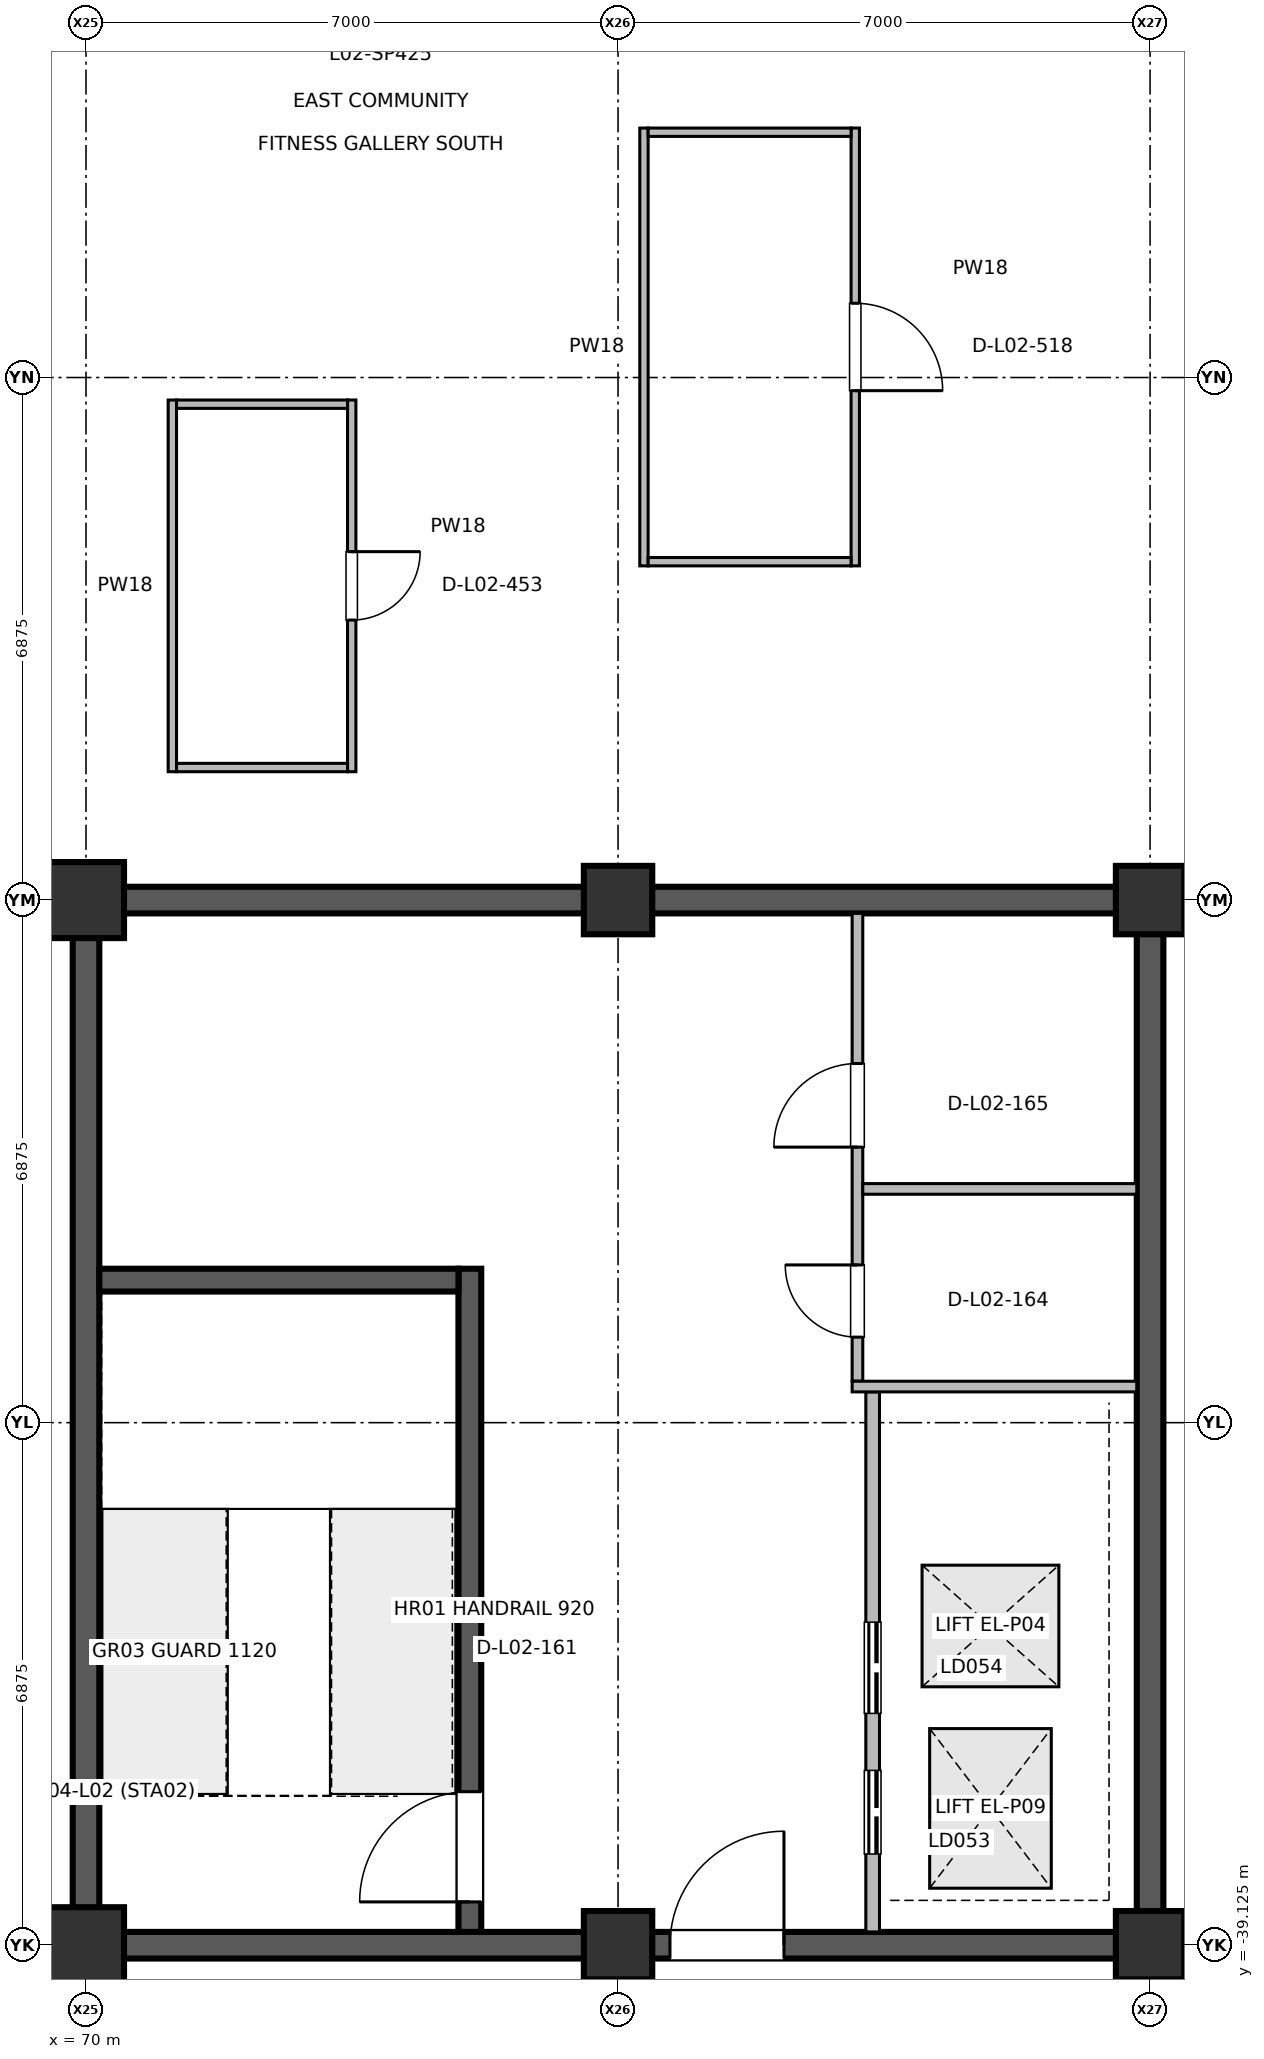
"""IFC4 building model, lengths in metres.
Left out: names, types, materials, properties, quantities, classifications, styles, units other than length and angle.
Written with IfcOpenShell. Run it as: python <this file> out.ifc"""

import sys

from ifc_helpers import new_model, si_unit, direction, frame, frame_2d, origin, origin_2d, place, context, subcontext, project, spatial, rectangle, extrude, element, fill, save


model = new_model("IFC4")
c1 = context("Model", 3, precision=1e-05, world=origin(), true_north=direction((0.0, 1.0)))
c2 = subcontext(c1, "Body", "Model", "MODEL_VIEW")
j1 = project(units=[si_unit("LENGTHUNIT", "METRE"), si_unit("PLANEANGLEUNIT", "RADIAN")], contexts=[c1])
p1 = place(None, origin())
s1 = spatial("IfcSite", under=j1, at=p1, CompositionType="ELEMENT")
p2 = place(p1, origin())
s2 = spatial("IfcBuilding", under=s1, at=p2, CompositionType="ELEMENT")
p3 = place(p2, frame((0.0, 0.0, 6.0)))
s3 = spatial("IfcBuildingStorey", under=s2, at=p3, CompositionType="ELEMENT", Elevation=6.0)
for number, where, z_axis, x_axis in (
    (1, (70.0, -39.125, 0.0), (0.0, 0.0, 1.0), (1.0, 0.0, 0.0)),
    (2, (70.0, -25.375, 0.0), (0.0, 0.0, 1.0), (1.0, 0.0, 0.0)),
):
    element("IfcColumn", number, at=place(p3, frame(where, z_axis=z_axis, x_axis=x_axis)), inside=s3, PredefinedType="COLUMN", context=c2, shape_type="SweptSolid", body=[
        extrude(rectangle(XDim=1.0, YDim=1.0, at=origin_2d()), origin(), (0.0, 0.0, 1.0), 5.398),
    ])
for number, where, z_axis, x_axis in (
    (3, (77.0, -39.125, 0.0), (0.0, 0.0, 1.0), (1.0, 0.0, 0.0)),
    (4, (77.0, -25.375, 0.0), (0.0, 0.0, 1.0), (1.0, 0.0, 0.0)),
    (5, (84.0, -39.125, 0.0), (0.0, 0.0, 1.0), (1.0, 0.0, 0.0)),
    (6, (84.0, -25.375, 0.0), (0.0, 0.0, 1.0), (1.0, 0.0, 0.0)),
):
    element("IfcColumn", number, at=place(p3, frame(where, z_axis=z_axis, x_axis=x_axis)), inside=s3, PredefinedType="COLUMN", context=c2, shape_type="SweptSolid", body=[
        extrude(rectangle(XDim=0.9, YDim=0.9, at=origin_2d()), origin(), (0.0, 0.0, 1.0), 5.398),
    ])
for number, where, z_axis, x_axis in (
    (7, (70.0, -38.95, 0.0), (0.0, 0.0, 1.0), (0.0, 1.0, 0.0)),
    (8, (84.0, -38.95, 0.0), (0.0, 0.0, 1.0), (0.0, 1.0, 0.0)),
):
    element("IfcWall", number, at=place(p3, frame(where, z_axis=z_axis, x_axis=x_axis)), inside=s3, PredefinedType="SHEAR", context=c2, shape_type="SweptSolid", body=[
        extrude(rectangle(XDim=13.4, YDim=0.35, at=frame_2d((6.7, 0.0))), origin(), (0.0, 0.0, 1.0), 5.15),
    ])
p4 = place(p3, frame((70.175, -39.125, 0.0), z_axis=(0.0, 0.0, 1.0), x_axis=(1.0, 0.0, 0.0)))
e9 = element("IfcWall", 9, at=p4, inside=s3, PredefinedType="SHEAR", context=c2, shape_type="SweptSolid", body=[
    extrude(rectangle(XDim=13.65, YDim=0.35, at=frame_2d((6.825, 0.0))), origin(), (0.0, 0.0, 1.0), 5.15),
])
p5 = place(p4, frame((7.508, 0.0, 0.0)))
e10 = element("IfcOpeningElement", 10, at=p5, cuts=e9, PredefinedType="OPENING", context=c2, shape_type="SweptSolid", body=[
    extrude(rectangle(XDim=1.5, YDim=2.2, at=frame_2d((0.75, 1.1))), frame((0.0, 0.185, 0.0), z_axis=(0.0, -1.0, 0.0), x_axis=(1.0, 0.0, 0.0)), (0.0, 0.0, 1.0), 0.37),
])
p6 = place(p3, frame((70.175, -25.375, 0.0), z_axis=(0.0, 0.0, 1.0), x_axis=(1.0, 0.0, 0.0)))
e11 = element("IfcWall", 11, at=p6, inside=s3, PredefinedType="SHEAR", context=c2, shape_type="SweptSolid", body=[
    extrude(rectangle(XDim=13.65, YDim=0.35, at=frame_2d((6.825, 0.0))), origin(), (0.0, 0.0, 1.0), 5.15),
])
p7 = place(p3, frame((75.05, -38.95, 0.0), z_axis=(0.0, 0.0, 1.0), x_axis=(0.0, 1.0, 0.0)))
e12 = element("IfcWall", 12, at=p7, inside=s3, PredefinedType="SHEAR", context=c2, shape_type="SweptSolid", body=[
    extrude(rectangle(XDim=8.725, YDim=0.3, at=frame_2d((4.362, 0.0))), origin(), (0.0, 0.0, 1.0), 5.15),
])
p8 = place(p7, frame((0.395, 0.0, 0.0)))
e13 = element("IfcOpeningElement", 13, at=p8, cuts=e12, PredefinedType="OPENING", context=c2, shape_type="SweptSolid", body=[
    extrude(rectangle(XDim=1.45, YDim=2.2, at=frame_2d((0.725, 1.1))), frame((0.0, 0.16, 0.0), z_axis=(0.0, -1.0, 0.0), x_axis=(1.0, 0.0, 0.0)), (0.0, 0.0, 1.0), 0.32),
])
p9 = place(p3, frame((80.35, -38.95, 0.0), z_axis=(0.0, 0.0, 1.0), x_axis=(0.0, 1.0, 0.0)))
e14 = element("IfcWall", 14, at=p9, inside=s3, PredefinedType="PARTITIONING", context=c2, shape_type="SweptSolid", body=[
    extrude(rectangle(XDim=7.105, YDim=0.18, at=frame_2d((3.552, 0.0))), origin(), (0.0, 0.0, 1.0), 4.42),
])
p10 = place(p9, frame((1.025, 0.0, 0.0)))
e15 = element("IfcOpeningElement", 15, at=p10, cuts=e14, PredefinedType="OPENING", context=c2, shape_type="SweptSolid", body=[
    extrude(rectangle(XDim=1.1, YDim=2.2, at=frame_2d((0.55, 1.1))), frame((0.0, 0.1, 0.0), z_axis=(0.0, -1.0, 0.0), x_axis=(1.0, 0.0, 0.0)), (0.0, 0.0, 1.0), 0.2),
])
p11 = place(p9, frame((2.875, 0.0, 0.0)))
e16 = element("IfcOpeningElement", 16, at=p11, cuts=e14, PredefinedType="OPENING", context=c2, shape_type="SweptSolid", body=[
    extrude(rectangle(XDim=1.2, YDim=2.25, at=frame_2d((0.6, 1.125))), frame((0.0, 0.1, 0.0), z_axis=(0.0, -1.0, 0.0), x_axis=(1.0, 0.0, 0.0)), (0.0, 0.0, 1.0), 0.2),
])
p12 = place(p3, frame((80.15, -31.705, 0.0), z_axis=(0.0, 0.0, 1.0), x_axis=(0.0, 1.0, 0.0)))
e17 = element("IfcWall", 17, at=p12, inside=s3, PredefinedType="PARTITIONING", context=c2, shape_type="SweptSolid", body=[
    extrude(rectangle(XDim=6.155, YDim=0.14, at=frame_2d((3.078, 0.0))), origin(), (0.0, 0.0, 1.0), 4.42),
])
p13 = place(p12, frame((0.58, 0.0, 0.0)))
e18 = element("IfcOpeningElement", 18, at=p13, cuts=e17, PredefinedType="OPENING", context=c2, shape_type="SweptSolid", body=[
    extrude(rectangle(XDim=0.95, YDim=2.15, at=frame_2d((0.475, 1.075))), frame((0.0, 0.08, 0.0), z_axis=(0.0, -1.0, 0.0), x_axis=(1.0, 0.0, 0.0)), (0.0, 0.0, 1.0), 0.16),
])
p14 = place(p12, frame((3.08, 0.0, 0.0)))
e19 = element("IfcOpeningElement", 19, at=p14, cuts=e17, PredefinedType="OPENING", context=c2, shape_type="SweptSolid", body=[
    extrude(rectangle(XDim=1.1, YDim=2.15, at=frame_2d((0.55, 1.075))), frame((0.0, 0.08, 0.0), z_axis=(0.0, -1.0, 0.0), x_axis=(1.0, 0.0, 0.0)), (0.0, 0.0, 1.0), 0.16),
])
p15 = place(p3, frame((73.496, -18.796, 0.0), z_axis=(0.0, 0.0, 1.0), x_axis=(0.0, -1.0, 0.0)))
e20 = element("IfcWall", 20, at=p15, inside=s3, PredefinedType="PARTITIONING", context=c2, shape_type="SweptSolid", body=[
    extrude(rectangle(XDim=4.89, YDim=0.11, at=frame_2d((2.445, 0.0))), origin(), (0.0, 0.0, 1.0), 4.42),
])
p16 = place(p15, frame((1.995, 0.0, 0.0)))
e21 = element("IfcOpeningElement", 21, at=p16, cuts=e20, PredefinedType="OPENING", context=c2, shape_type="SweptSolid", body=[
    extrude(rectangle(XDim=0.9, YDim=2.15, at=frame_2d((0.45, 1.075))), frame((0.0, 0.065, 0.0), z_axis=(0.0, -1.0, 0.0), x_axis=(1.0, 0.0, 0.0)), (0.0, 0.0, 1.0), 0.13),
])
p17 = place(p3, frame((80.121, -15.218, 0.0), z_axis=(0.0, 0.0, 1.0), x_axis=(0.0, -1.0, 0.0)))
e22 = element("IfcWall", 22, at=p17, inside=s3, PredefinedType="PARTITIONING", context=c2, shape_type="SweptSolid", body=[
    extrude(rectangle(XDim=5.76, YDim=0.11, at=frame_2d((2.88, 0.0))), origin(), (0.0, 0.0, 1.0), 4.42),
])
p18 = place(p17, frame((2.305, 0.0, 0.0)))
e23 = element("IfcOpeningElement", 23, at=p18, cuts=e22, PredefinedType="OPENING", context=c2, shape_type="SweptSolid", body=[
    extrude(rectangle(XDim=1.15, YDim=2.2, at=frame_2d((0.575, 1.1))), frame((0.0, 0.065, 0.0), z_axis=(0.0, -1.0, 0.0), x_axis=(1.0, 0.0, 0.0)), (0.0, 0.0, 1.0), 0.13),
])
p19 = place(p3, frame((80.08, -31.775, 0.0), z_axis=(0.0, 0.0, 1.0), x_axis=(1.0, 0.0, 0.0)))
e24 = element("IfcWall", 24, at=p19, inside=s3, PredefinedType="PARTITIONING", context=c2, shape_type="SweptSolid", body=[
    extrude(rectangle(XDim=3.745, YDim=0.14, at=frame_2d((1.873, 0.0))), origin(), (0.0, 0.0, 1.0), 4.42),
])
p20 = place(p3, frame((80.22, -29.175, 0.0), z_axis=(0.0, 0.0, 1.0), x_axis=(1.0, 0.0, 0.0)))
e25 = element("IfcWall", 25, at=p20, inside=s3, PredefinedType="PARTITIONING", context=c2, shape_type="SweptSolid", body=[
    extrude(rectangle(XDim=3.605, YDim=0.14, at=frame_2d((1.802, 0.0))), origin(), (0.0, 0.0, 1.0), 4.42),
])
p21 = place(p3, frame((71.136, -23.686, 0.0), z_axis=(0.0, 0.0, 1.0), x_axis=(0.0, 1.0, 0.0)))
e26 = element("IfcWall", 26, at=p21, inside=s3, PredefinedType="PARTITIONING", context=c2, shape_type="SweptSolid", body=[
    extrude(rectangle(XDim=4.89, YDim=0.11, at=frame_2d((2.445, 0.0))), origin(), (0.0, 0.0, 1.0), 4.42),
])
for number, where, z_axis, x_axis in (
    (27, (71.191, -23.631, 0.0), (0.0, 0.0, 1.0), (1.0, 0.0, 0.0)),
    (28, (71.191, -18.851, 0.0), (0.0, 0.0, 1.0), (1.0, 0.0, 0.0)),
):
    element("IfcWall", number, at=place(p3, frame(where, z_axis=z_axis, x_axis=x_axis)), inside=s3, PredefinedType="PARTITIONING", context=c2, shape_type="SweptSolid", body=[
        extrude(rectangle(XDim=2.25, YDim=0.11, at=frame_2d((1.125, 0.0))), origin(), (0.0, 0.0, 1.0), 4.42),
    ])
p22 = place(p3, frame((77.341, -20.978, 0.0), z_axis=(0.0, 0.0, 1.0), x_axis=(0.0, 1.0, 0.0)))
e29 = element("IfcWall", 29, at=p22, inside=s3, PredefinedType="PARTITIONING", context=c2, shape_type="SweptSolid", body=[
    extrude(rectangle(XDim=5.76, YDim=0.11, at=frame_2d((2.88, 0.0))), origin(), (0.0, 0.0, 1.0), 3.925),
])
for number, where, z_axis, x_axis in (
    (30, (77.396, -20.923, 0.0), (0.0, 0.0, 1.0), (1.0, 0.0, 0.0)),
    (31, (77.396, -15.273, 0.0), (0.0, 0.0, 1.0), (1.0, 0.0, 0.0)),
):
    element("IfcWall", number, at=place(p3, frame(where, z_axis=z_axis, x_axis=x_axis)), inside=s3, PredefinedType="PARTITIONING", context=c2, shape_type="SweptSolid", body=[
        extrude(rectangle(XDim=2.67, YDim=0.11, at=frame_2d((1.335, 0.0))), origin(), (0.0, 0.0, 1.0), 3.925),
    ])
p23 = place(p3, frame((70.175, -30.375, 0.0), z_axis=(0.0, 0.0, 1.0), x_axis=(1.0, 0.0, 0.0)))
e32 = element("IfcWall", 32, at=p23, inside=s3, PredefinedType="SHEAR", context=c2, shape_type="SweptSolid", body=[
    extrude(rectangle(XDim=4.725, YDim=0.3, at=frame_2d((2.362, 0.0))), origin(), (0.0, 0.0, 1.0), 5.15),
])
p24 = place(p5, origin())
e33 = element("IfcDoor", 33, at=p24, inside=s3, OperationType="SINGLE_SWING_RIGHT", PredefinedType="DOOR", context=c2, shape_type="SweptSolid", body=[
    extrude(rectangle(XDim=1.5, YDim=2.2, at=frame_2d((0.75, 1.1))), frame((0.0, 0.025, 0.0), z_axis=(0.0, -1.0, 0.0), x_axis=(1.0, 0.0, 0.0)), (0.0, 0.0, 1.0), 0.05),
])
fill(e10, e33)
p25 = place(p8, origin())
e34 = element("IfcDoor", 34, at=p25, inside=s3, OperationType="SINGLE_SWING_LEFT", PredefinedType="DOOR", context=c2, shape_type="SweptSolid", body=[
    extrude(rectangle(XDim=1.45, YDim=2.2, at=frame_2d((0.725, 1.1))), frame((0.0, 0.025, 0.0), z_axis=(0.0, -1.0, 0.0), x_axis=(1.0, 0.0, 0.0)), (0.0, 0.0, 1.0), 0.05),
])
fill(e13, e34)
p26 = place(p10, origin())
e35 = element("IfcDoor", 35, at=p26, inside=s3, OperationType="DOUBLE_DOOR_SLIDING", PredefinedType="DOOR", context=c2, shape_type="SweptSolid", body=[
    extrude(rectangle(XDim=1.1, YDim=2.2, at=frame_2d((0.55, 1.1))), frame((0.0, 0.025, 0.0), z_axis=(0.0, -1.0, 0.0), x_axis=(1.0, 0.0, 0.0)), (0.0, 0.0, 1.0), 0.05),
])
fill(e15, e35)
p27 = place(p11, origin())
e36 = element("IfcDoor", 36, at=p27, inside=s3, OperationType="DOUBLE_DOOR_SLIDING", PredefinedType="DOOR", context=c2, shape_type="SweptSolid", body=[
    extrude(rectangle(XDim=1.2, YDim=2.25, at=frame_2d((0.6, 1.125))), frame((0.0, 0.025, 0.0), z_axis=(0.0, -1.0, 0.0), x_axis=(1.0, 0.0, 0.0)), (0.0, 0.0, 1.0), 0.05),
])
fill(e16, e36)
p28 = place(p13, origin())
e37 = element("IfcDoor", 37, at=p28, inside=s3, OperationType="SINGLE_SWING_RIGHT", PredefinedType="DOOR", context=c2, shape_type="SweptSolid", body=[
    extrude(rectangle(XDim=0.95, YDim=2.15, at=frame_2d((0.475, 1.075))), frame((0.0, 0.025, 0.0), z_axis=(0.0, -1.0, 0.0), x_axis=(1.0, 0.0, 0.0)), (0.0, 0.0, 1.0), 0.05),
])
fill(e18, e37)
p29 = place(p14, origin())
e38 = element("IfcDoor", 38, at=p29, inside=s3, OperationType="SINGLE_SWING_LEFT", PredefinedType="DOOR", context=c2, shape_type="SweptSolid", body=[
    extrude(rectangle(XDim=1.1, YDim=2.15, at=frame_2d((0.55, 1.075))), frame((0.0, 0.025, 0.0), z_axis=(0.0, -1.0, 0.0), x_axis=(1.0, 0.0, 0.0)), (0.0, 0.0, 1.0), 0.05),
])
fill(e19, e38)
p30 = place(p16, origin())
e39 = element("IfcDoor", 39, at=p30, inside=s3, OperationType="SINGLE_SWING_LEFT", PredefinedType="DOOR", context=c2, shape_type="SweptSolid", body=[
    extrude(rectangle(XDim=0.9, YDim=2.15, at=frame_2d((0.45, 1.075))), frame((0.0, 0.025, 0.0), z_axis=(0.0, -1.0, 0.0), x_axis=(1.0, 0.0, 0.0)), (0.0, 0.0, 1.0), 0.05),
])
fill(e21, e39)
p31 = place(p18, origin())
e40 = element("IfcDoor", 40, at=p31, inside=s3, OperationType="SINGLE_SWING_RIGHT", PredefinedType="DOOR", context=c2, shape_type="SweptSolid", body=[
    extrude(rectangle(XDim=1.15, YDim=2.2, at=frame_2d((0.575, 1.1))), frame((0.0, 0.025, 0.0), z_axis=(0.0, -1.0, 0.0), x_axis=(1.0, 0.0, 0.0)), (0.0, 0.0, 1.0), 0.05),
])
fill(e23, e40)
save(model, sys.argv[1])
